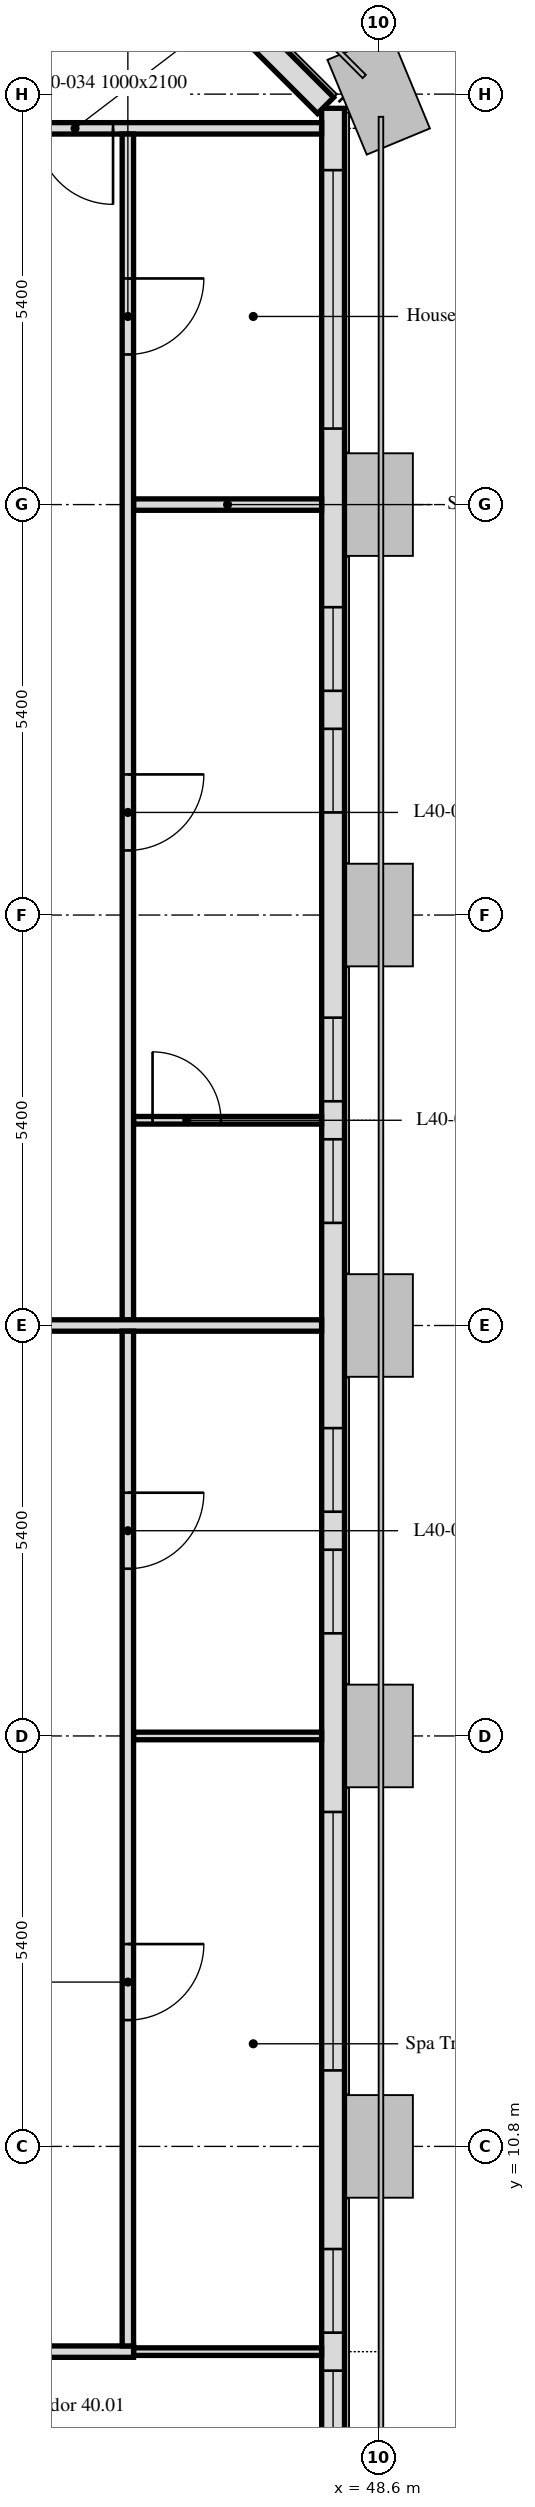
"""IFC4 building model, lengths in metres.
Left out: names, types, materials, properties, quantities, classifications, styles, units other than length and angle.
Written with IfcOpenShell. Run it as: python <this file> out.ifc"""

import sys

from ifc_helpers import new_model, si_unit, direction, frame, frame_2d, origin, place, context, subcontext, project, spatial, rectangle, extrude, element, fill, save


model = new_model("IFC4")
c1 = context("Model", 3, precision=1e-05, world=origin(), true_north=direction((0.0, 1.0)))
c2 = subcontext(c1, "Body", "Model", "MODEL_VIEW")
j1 = project(units=[si_unit("LENGTHUNIT", "METRE"), si_unit("PLANEANGLEUNIT", "RADIAN")], contexts=[c1])
p1 = place(None, origin())
s1 = spatial("IfcSite", under=j1, at=p1, CompositionType="ELEMENT")
p2 = place(p1, origin())
s2 = spatial("IfcBuilding", under=s1, at=p2, CompositionType="ELEMENT")
p3 = place(p2, frame((0.0, 0.0, 169.3)))
s3 = spatial("IfcBuildingStorey", under=s2, at=p3, CompositionType="ELEMENT", Elevation=169.3)
p4 = place(p3, frame((48.0, 5.586, 0.0), z_axis=(0.0, 0.0, 1.0), x_axis=(0.0, 1.0, 0.0)))
e1 = element("IfcWall", 1, at=p4, inside=s3, PredefinedType="SOLIDWALL", context=c2, shape_type="SweptSolid", body=[
    extrude(rectangle(XDim=32.027, YDim=0.3, at=frame_2d((16.014, 0.0))), origin(), (0.0, 0.0, 1.0), 3.0),
])
p5 = place(p4, frame((1.164, 0.0, 0.9)))
e2 = element("IfcOpeningElement", 2, at=p5, cuts=e1, PredefinedType="OPENING", context=c2, shape_type="SweptSolid", body=[
    extrude(rectangle(XDim=1.1, YDim=1.7, at=frame_2d((0.55, 0.85))), frame((0.0, 0.16, 0.0), z_axis=(0.0, -1.0, 0.0), x_axis=(1.0, 0.0, 0.0)), (0.0, 0.0, 1.0), 0.32),
])
p6 = place(p4, frame((2.764, 0.0, 0.9)))
e3 = element("IfcOpeningElement", 3, at=p6, cuts=e1, PredefinedType="OPENING", context=c2, shape_type="SweptSolid", body=[
    extrude(rectangle(XDim=1.1, YDim=1.7, at=frame_2d((0.55, 0.85))), frame((0.0, 0.16, 0.0), z_axis=(0.0, -1.0, 0.0), x_axis=(1.0, 0.0, 0.0)), (0.0, 0.0, 1.0), 0.32),
])
p7 = place(p4, frame((6.214, 0.0, 0.9)))
e4 = element("IfcOpeningElement", 4, at=p7, cuts=e1, PredefinedType="OPENING", context=c2, shape_type="SweptSolid", body=[
    extrude(rectangle(XDim=3.4, YDim=1.7, at=frame_2d((1.7, 0.85))), frame((0.0, 0.16, 0.0), z_axis=(0.0, -1.0, 0.0), x_axis=(1.0, 0.0, 0.0)), (0.0, 0.0, 1.0), 0.32),
])
p8 = place(p4, frame((11.964, 0.0, 0.9)))
e5 = element("IfcOpeningElement", 5, at=p8, cuts=e1, PredefinedType="OPENING", context=c2, shape_type="SweptSolid", body=[
    extrude(rectangle(XDim=1.1, YDim=1.7, at=frame_2d((0.55, 0.85))), frame((0.0, 0.16, 0.0), z_axis=(0.0, -1.0, 0.0), x_axis=(1.0, 0.0, 0.0)), (0.0, 0.0, 1.0), 0.32),
])
p9 = place(p4, frame((13.564, 0.0, 0.9)))
e6 = element("IfcOpeningElement", 6, at=p9, cuts=e1, PredefinedType="OPENING", context=c2, shape_type="SweptSolid", body=[
    extrude(rectangle(XDim=1.1, YDim=1.7, at=frame_2d((0.55, 0.85))), frame((0.0, 0.16, 0.0), z_axis=(0.0, -1.0, 0.0), x_axis=(1.0, 0.0, 0.0)), (0.0, 0.0, 1.0), 0.32),
])
p10 = place(p4, frame((17.364, 0.0, 0.9)))
e7 = element("IfcOpeningElement", 7, at=p10, cuts=e1, PredefinedType="OPENING", context=c2, shape_type="SweptSolid", body=[
    extrude(rectangle(XDim=1.1, YDim=1.7, at=frame_2d((0.55, 0.85))), frame((0.0, 0.16, 0.0), z_axis=(0.0, -1.0, 0.0), x_axis=(1.0, 0.0, 0.0)), (0.0, 0.0, 1.0), 0.32),
])
p11 = place(p4, frame((18.964, 0.0, 0.9)))
e8 = element("IfcOpeningElement", 8, at=p11, cuts=e1, PredefinedType="OPENING", context=c2, shape_type="SweptSolid", body=[
    extrude(rectangle(XDim=1.1, YDim=1.7, at=frame_2d((0.55, 0.85))), frame((0.0, 0.16, 0.0), z_axis=(0.0, -1.0, 0.0), x_axis=(1.0, 0.0, 0.0)), (0.0, 0.0, 1.0), 0.32),
])
p12 = place(p4, frame((22.764, 0.0, 0.9)))
e9 = element("IfcOpeningElement", 9, at=p12, cuts=e1, PredefinedType="OPENING", context=c2, shape_type="SweptSolid", body=[
    extrude(rectangle(XDim=1.1, YDim=1.7, at=frame_2d((0.55, 0.85))), frame((0.0, 0.16, 0.0), z_axis=(0.0, -1.0, 0.0), x_axis=(1.0, 0.0, 0.0)), (0.0, 0.0, 1.0), 0.32),
])
p13 = place(p4, frame((24.364, 0.0, 0.9)))
e10 = element("IfcOpeningElement", 10, at=p13, cuts=e1, PredefinedType="OPENING", context=c2, shape_type="SweptSolid", body=[
    extrude(rectangle(XDim=1.1, YDim=1.7, at=frame_2d((0.55, 0.85))), frame((0.0, 0.16, 0.0), z_axis=(0.0, -1.0, 0.0), x_axis=(1.0, 0.0, 0.0)), (0.0, 0.0, 1.0), 0.32),
])
p14 = place(p4, frame((27.814, 0.0, 0.9)))
e11 = element("IfcOpeningElement", 11, at=p14, cuts=e1, PredefinedType="OPENING", context=c2, shape_type="SweptSolid", body=[
    extrude(rectangle(XDim=3.4, YDim=1.7, at=frame_2d((1.7, 0.85))), frame((0.0, 0.16, 0.0), z_axis=(0.0, -1.0, 0.0), x_axis=(1.0, 0.0, 0.0)), (0.0, 0.0, 1.0), 0.32),
])
p15 = place(p3, frame((47.901, 37.65, 0.0), z_axis=(0.0, 0.0, 1.0), x_axis=(-0.707106781187, 0.707106781187, 0.0)))
e12 = element("IfcWall", 12, at=p15, inside=s3, PredefinedType="SOLIDWALL", context=c2, shape_type="SweptSolid", body=[
    extrude(rectangle(XDim=6.86, YDim=0.3, at=frame_2d((3.43, 0.0))), origin(), (0.0, 0.0, 1.0), 3.0),
])
p16 = place(p15, frame((1.28, 0.0, 0.9)))
e13 = element("IfcOpeningElement", 13, at=p16, cuts=e12, PredefinedType="OPENING", context=c2, shape_type="SweptSolid", body=[
    extrude(rectangle(XDim=1.1, YDim=1.7, at=frame_2d((0.55, 0.85))), frame((0.0, 0.16, 0.0), z_axis=(0.0, -1.0, 0.0), x_axis=(1.0, 0.0, 0.0)), (0.0, 0.0, 1.0), 0.32),
])
p17 = place(p15, frame((4.48, 0.0, 0.9)))
e14 = element("IfcOpeningElement", 14, at=p17, cuts=e12, PredefinedType="OPENING", context=c2, shape_type="SweptSolid", body=[
    extrude(rectangle(XDim=1.1, YDim=1.7, at=frame_2d((0.55, 0.85))), frame((0.0, 0.16, 0.0), z_axis=(0.0, -1.0, 0.0), x_axis=(1.0, 0.0, 0.0)), (0.0, 0.0, 1.0), 0.32),
])
p18 = place(p3, frame((45.375, 32.4, 0.0), z_axis=(0.0, 0.0, 1.0), x_axis=(1.0, 0.0, 0.0)))
e15 = element("IfcWall", 15, at=p18, inside=s3, PredefinedType="PARTITIONING", context=c2, shape_type="SweptSolid", body=[
    extrude(rectangle(XDim=2.474, YDim=0.15, at=frame_2d((1.237, 0.0))), origin(), (0.0, 0.0, 1.0), 2.4),
])
p19 = place(p3, frame((47.849, 37.35, 0.0), z_axis=(0.0, 0.0, 1.0), x_axis=(-1.0, 0.0, 0.0)))
e16 = element("IfcWall", 16, at=p19, inside=s3, PredefinedType="PARTITIONING", context=c2, shape_type="SweptSolid", body=[
    extrude(rectangle(XDim=41.698, YDim=0.15, at=frame_2d((20.849, 0.0))), origin(), (0.0, 0.0, 1.0), 3.0),
])
p20 = place(p19, frame((39.249, 0.0, 0.0)))
e17 = element("IfcOpeningElement", 17, at=p20, cuts=e16, PredefinedType="OPENING", context=c2, shape_type="SweptSolid", body=[
    extrude(rectangle(XDim=1.0, YDim=2.1, at=frame_2d((0.5, 1.05))), frame((0.0, 0.075, 0.0), z_axis=(0.0, -1.0, 0.0), x_axis=(1.0, 0.0, 0.0)), (0.0, 0.0, 1.0), 0.15),
])
p21 = place(p19, frame((27.649, 0.0, 0.0)))
e18 = element("IfcOpeningElement", 18, at=p21, cuts=e16, PredefinedType="OPENING", context=c2, shape_type="SweptSolid", body=[
    extrude(rectangle(XDim=1.0, YDim=2.1, at=frame_2d((0.5, 1.05))), frame((0.0, 0.075, 0.0), z_axis=(0.0, -1.0, 0.0), x_axis=(1.0, 0.0, 0.0)), (0.0, 0.0, 1.0), 0.15),
])
p22 = place(p19, frame((22.249, 0.0, 0.0)))
e19 = element("IfcOpeningElement", 19, at=p22, cuts=e16, PredefinedType="OPENING", context=c2, shape_type="SweptSolid", body=[
    extrude(rectangle(XDim=1.0, YDim=2.1, at=frame_2d((0.5, 1.05))), frame((0.0, 0.075, 0.0), z_axis=(0.0, -1.0, 0.0), x_axis=(1.0, 0.0, 0.0)), (0.0, 0.0, 1.0), 0.15),
])
p23 = place(p19, frame((17.649, 0.0, 0.0)))
e20 = element("IfcOpeningElement", 20, at=p23, cuts=e16, PredefinedType="OPENING", context=c2, shape_type="SweptSolid", body=[
    extrude(rectangle(XDim=1.0, YDim=2.1, at=frame_2d((0.5, 1.05))), frame((0.0, 0.075, 0.0), z_axis=(0.0, -1.0, 0.0), x_axis=(1.0, 0.0, 0.0)), (0.0, 0.0, 1.0), 0.15),
])
p24 = place(p19, frame((2.744, 0.0, 0.0)))
e21 = element("IfcOpeningElement", 21, at=p24, cuts=e16, PredefinedType="OPENING", context=c2, shape_type="SweptSolid", body=[
    extrude(rectangle(XDim=1.0, YDim=2.1, at=frame_2d((0.5, 1.05))), frame((0.0, 0.075, 0.0), z_axis=(0.0, -1.0, 0.0), x_axis=(1.0, 0.0, 0.0)), (0.0, 0.0, 1.0), 0.15),
])
p25 = place(p3, frame((45.375, 24.3, 0.0), z_axis=(0.0, 0.0, 1.0), x_axis=(1.0, 0.0, 0.0)))
e22 = element("IfcWall", 22, at=p25, inside=s3, PredefinedType="PARTITIONING", context=c2, shape_type="SweptSolid", body=[
    extrude(rectangle(XDim=2.474, YDim=0.1, at=frame_2d((1.237, 0.0))), origin(), (0.0, 0.0, 1.0), 3.0),
])
p26 = place(p25, frame((0.25, 0.0, 0.0)))
e23 = element("IfcOpeningElement", 23, at=p26, cuts=e22, PredefinedType="OPENING", context=c2, shape_type="SweptSolid", body=[
    extrude(rectangle(XDim=0.9, YDim=2.1, at=frame_2d((0.45, 1.05))), frame((0.0, 0.05, 0.0), z_axis=(0.0, -1.0, 0.0), x_axis=(1.0, 0.0, 0.0)), (0.0, 0.0, 1.0), 0.1),
])
p27 = place(p3, frame((45.3, 37.275, 0.0), z_axis=(0.0, 0.0, 1.0), x_axis=(0.0, -1.0, 0.0)))
e24 = element("IfcWall", 24, at=p27, inside=s3, PredefinedType="PARTITIONING", context=c2, shape_type="SweptSolid", body=[
    extrude(rectangle(XDim=15.6, YDim=0.15, at=frame_2d((7.8, 0.0))), origin(), (0.0, 0.0, 1.0), 2.4),
])
p28 = place(p27, frame((1.9, 0.0, 0.0)))
e25 = element("IfcOpeningElement", 25, at=p28, cuts=e24, PredefinedType="OPENING", context=c2, shape_type="SweptSolid", body=[
    extrude(rectangle(XDim=1.0, YDim=2.1, at=frame_2d((0.5, 1.05))), frame((0.0, 0.075, 0.0), z_axis=(0.0, -1.0, 0.0), x_axis=(1.0, 0.0, 0.0)), (0.0, 0.0, 1.0), 0.15),
])
p29 = place(p27, frame((8.425, 0.0, 0.0)))
e26 = element("IfcOpeningElement", 26, at=p29, cuts=e24, PredefinedType="OPENING", context=c2, shape_type="SweptSolid", body=[
    extrude(rectangle(XDim=1.0, YDim=2.1, at=frame_2d((0.5, 1.05))), frame((0.0, 0.075, 0.0), z_axis=(0.0, -1.0, 0.0), x_axis=(1.0, 0.0, 0.0)), (0.0, 0.0, 1.0), 0.15),
])
p30 = place(p3, frame((43.2, 21.6, 0.0), z_axis=(0.0, 0.0, 1.0), x_axis=(1.0, 0.0, 0.0)))
e27 = element("IfcWall", 27, at=p30, inside=s3, PredefinedType="PARTITIONING", context=c2, shape_type="SweptSolid", body=[
    extrude(rectangle(XDim=4.649, YDim=0.15, at=frame_2d((2.325, 0.0))), origin(), (0.0, 0.0, 1.0), 2.4),
])
p31 = place(p3, frame((45.375, 8.1, 0.0), z_axis=(0.0, 0.0, 1.0), x_axis=(1.0, 0.0, 0.0)))
e28 = element("IfcWall", 28, at=p31, inside=s3, PredefinedType="PARTITIONING", context=c2, shape_type="SweptSolid", body=[
    extrude(rectangle(XDim=2.474, YDim=0.1, at=frame_2d((1.237, 0.0))), origin(), (0.0, 0.0, 1.0), 3.0),
])
p32 = place(p3, frame((47.849, 16.2, 0.0), z_axis=(0.0, 0.0, 1.0), x_axis=(-1.0, 0.0, 0.0)))
e29 = element("IfcWall", 29, at=p32, inside=s3, PredefinedType="PARTITIONING", context=c2, shape_type="SweptSolid", body=[
    extrude(rectangle(XDim=2.474, YDim=0.1, at=frame_2d((1.237, 0.0))), origin(), (0.0, 0.0, 1.0), 2.4),
])
p33 = place(p3, frame((45.375, 8.1, 0.0), z_axis=(0.0, 0.0, 1.0), x_axis=(-1.0, 0.0, 0.0)))
e30 = element("IfcWall", 30, at=p33, inside=s3, PredefinedType="PARTITIONING", context=c2, shape_type="SweptSolid", body=[
    extrude(rectangle(XDim=39.224, YDim=0.15, at=frame_2d((19.612, 0.0))), origin(), (0.0, 0.0, 1.0), 2.4),
])
p34 = place(p33, frame((36.775, 0.0, 0.0)))
e31 = element("IfcOpeningElement", 31, at=p34, cuts=e30, PredefinedType="OPENING", context=c2, shape_type="SweptSolid", body=[
    extrude(rectangle(XDim=1.0, YDim=2.1, at=frame_2d((0.5, 1.05))), frame((0.0, 0.075, 0.0), z_axis=(0.0, -1.0, 0.0), x_axis=(1.0, 0.0, 0.0)), (0.0, 0.0, 1.0), 0.15),
])
p35 = place(p33, frame((31.375, 0.0, 0.0)))
e32 = element("IfcOpeningElement", 32, at=p35, cuts=e30, PredefinedType="OPENING", context=c2, shape_type="SweptSolid", body=[
    extrude(rectangle(XDim=1.0, YDim=2.1, at=frame_2d((0.5, 1.05))), frame((0.0, 0.075, 0.0), z_axis=(0.0, -1.0, 0.0), x_axis=(1.0, 0.0, 0.0)), (0.0, 0.0, 1.0), 0.15),
])
p36 = place(p33, frame((25.975, 0.0, 0.0)))
e33 = element("IfcOpeningElement", 33, at=p36, cuts=e30, PredefinedType="OPENING", context=c2, shape_type="SweptSolid", body=[
    extrude(rectangle(XDim=1.0, YDim=2.1, at=frame_2d((0.5, 1.05))), frame((0.0, 0.075, 0.0), z_axis=(0.0, -1.0, 0.0), x_axis=(1.0, 0.0, 0.0)), (0.0, 0.0, 1.0), 0.15),
])
p37 = place(p33, frame((20.575, 0.0, 0.0)))
e34 = element("IfcOpeningElement", 34, at=p37, cuts=e30, PredefinedType="OPENING", context=c2, shape_type="SweptSolid", body=[
    extrude(rectangle(XDim=1.0, YDim=2.1, at=frame_2d((0.5, 1.05))), frame((0.0, 0.075, 0.0), z_axis=(0.0, -1.0, 0.0), x_axis=(1.0, 0.0, 0.0)), (0.0, 0.0, 1.0), 0.15),
])
p38 = place(p33, frame((15.175, 0.0, 0.0)))
e35 = element("IfcOpeningElement", 35, at=p38, cuts=e30, PredefinedType="OPENING", context=c2, shape_type="SweptSolid", body=[
    extrude(rectangle(XDim=1.0, YDim=2.1, at=frame_2d((0.5, 1.05))), frame((0.0, 0.075, 0.0), z_axis=(0.0, -1.0, 0.0), x_axis=(1.0, 0.0, 0.0)), (0.0, 0.0, 1.0), 0.15),
])
p39 = place(p33, frame((9.775, 0.0, 0.0)))
e36 = element("IfcOpeningElement", 36, at=p39, cuts=e30, PredefinedType="OPENING", context=c2, shape_type="SweptSolid", body=[
    extrude(rectangle(XDim=1.0, YDim=2.1, at=frame_2d((0.5, 1.05))), frame((0.0, 0.075, 0.0), z_axis=(0.0, -1.0, 0.0), x_axis=(1.0, 0.0, 0.0)), (0.0, 0.0, 1.0), 0.15),
])
p40 = place(p33, frame((3.325, 0.0, 0.0)))
e37 = element("IfcOpeningElement", 37, at=p40, cuts=e30, PredefinedType="OPENING", context=c2, shape_type="SweptSolid", body=[
    extrude(rectangle(XDim=1.0, YDim=2.1, at=frame_2d((0.5, 1.05))), frame((0.0, 0.075, 0.0), z_axis=(0.0, -1.0, 0.0), x_axis=(1.0, 0.0, 0.0)), (0.0, 0.0, 1.0), 0.15),
])
p41 = place(p3, frame((45.3, 21.525, 0.0), z_axis=(0.0, 0.0, 1.0), x_axis=(0.0, -1.0, 0.0)))
e38 = element("IfcWall", 38, at=p41, inside=s3, PredefinedType="PARTITIONING", context=c2, shape_type="SweptSolid", body=[
    extrude(rectangle(XDim=13.35, YDim=0.15, at=frame_2d((6.675, 0.0))), origin(), (0.0, 0.0, 1.0), 2.4),
])
p42 = place(p41, frame((8.063, 0.0, 0.0)))
e39 = element("IfcOpeningElement", 39, at=p42, cuts=e38, PredefinedType="OPENING", context=c2, shape_type="SweptSolid", body=[
    extrude(rectangle(XDim=1.0, YDim=2.1, at=frame_2d((0.5, 1.05))), frame((0.0, 0.075, 0.0), z_axis=(0.0, -1.0, 0.0), x_axis=(1.0, 0.0, 0.0)), (0.0, 0.0, 1.0), 0.15),
])
p43 = place(p41, frame((2.125, 0.0, 0.0)))
e40 = element("IfcOpeningElement", 40, at=p43, cuts=e38, PredefinedType="OPENING", context=c2, shape_type="SweptSolid", body=[
    extrude(rectangle(XDim=1.0, YDim=2.1, at=frame_2d((0.5, 1.05))), frame((0.0, 0.075, 0.0), z_axis=(0.0, -1.0, 0.0), x_axis=(1.0, 0.0, 0.0)), (0.0, 0.0, 1.0), 0.15),
])
p44 = place(p5, origin())
e41 = element("IfcWindow", 41, at=p44, inside=s3, PartitioningType="SINGLE_PANEL", PredefinedType="WINDOW", context=c2, shape_type="SweptSolid", body=[
    extrude(rectangle(XDim=1.1, YDim=1.7, at=frame_2d((0.55, 0.85))), frame((0.0, 0.03, 0.0), z_axis=(0.0, -1.0, 0.0), x_axis=(1.0, 0.0, 0.0)), (0.0, 0.0, 1.0), 0.06),
])
fill(e2, e41)
p45 = place(p6, origin())
e42 = element("IfcWindow", 42, at=p45, inside=s3, PartitioningType="SINGLE_PANEL", PredefinedType="WINDOW", context=c2, shape_type="SweptSolid", body=[
    extrude(rectangle(XDim=1.1, YDim=1.7, at=frame_2d((0.55, 0.85))), frame((0.0, 0.03, 0.0), z_axis=(0.0, -1.0, 0.0), x_axis=(1.0, 0.0, 0.0)), (0.0, 0.0, 1.0), 0.06),
])
fill(e3, e42)
p46 = place(p7, origin())
e43 = element("IfcWindow", 43, at=p46, inside=s3, PartitioningType="SINGLE_PANEL", PredefinedType="WINDOW", context=c2, shape_type="SweptSolid", body=[
    extrude(rectangle(XDim=3.4, YDim=1.7, at=frame_2d((1.7, 0.85))), frame((0.0, 0.03, 0.0), z_axis=(0.0, -1.0, 0.0), x_axis=(1.0, 0.0, 0.0)), (0.0, 0.0, 1.0), 0.06),
])
fill(e4, e43)
p47 = place(p8, origin())
e44 = element("IfcWindow", 44, at=p47, inside=s3, PartitioningType="SINGLE_PANEL", PredefinedType="WINDOW", context=c2, shape_type="SweptSolid", body=[
    extrude(rectangle(XDim=1.1, YDim=1.7, at=frame_2d((0.55, 0.85))), frame((0.0, 0.03, 0.0), z_axis=(0.0, -1.0, 0.0), x_axis=(1.0, 0.0, 0.0)), (0.0, 0.0, 1.0), 0.06),
])
fill(e5, e44)
p48 = place(p9, origin())
e45 = element("IfcWindow", 45, at=p48, inside=s3, PartitioningType="SINGLE_PANEL", PredefinedType="WINDOW", context=c2, shape_type="SweptSolid", body=[
    extrude(rectangle(XDim=1.1, YDim=1.7, at=frame_2d((0.55, 0.85))), frame((0.0, 0.03, 0.0), z_axis=(0.0, -1.0, 0.0), x_axis=(1.0, 0.0, 0.0)), (0.0, 0.0, 1.0), 0.06),
])
fill(e6, e45)
p49 = place(p10, origin())
e46 = element("IfcWindow", 46, at=p49, inside=s3, PartitioningType="SINGLE_PANEL", PredefinedType="WINDOW", context=c2, shape_type="SweptSolid", body=[
    extrude(rectangle(XDim=1.1, YDim=1.7, at=frame_2d((0.55, 0.85))), frame((0.0, 0.03, 0.0), z_axis=(0.0, -1.0, 0.0), x_axis=(1.0, 0.0, 0.0)), (0.0, 0.0, 1.0), 0.06),
])
fill(e7, e46)
p50 = place(p11, origin())
e47 = element("IfcWindow", 47, at=p50, inside=s3, PartitioningType="SINGLE_PANEL", PredefinedType="WINDOW", context=c2, shape_type="SweptSolid", body=[
    extrude(rectangle(XDim=1.1, YDim=1.7, at=frame_2d((0.55, 0.85))), frame((0.0, 0.03, 0.0), z_axis=(0.0, -1.0, 0.0), x_axis=(1.0, 0.0, 0.0)), (0.0, 0.0, 1.0), 0.06),
])
fill(e8, e47)
p51 = place(p12, origin())
e48 = element("IfcWindow", 48, at=p51, inside=s3, PartitioningType="SINGLE_PANEL", PredefinedType="WINDOW", context=c2, shape_type="SweptSolid", body=[
    extrude(rectangle(XDim=1.1, YDim=1.7, at=frame_2d((0.55, 0.85))), frame((0.0, 0.03, 0.0), z_axis=(0.0, -1.0, 0.0), x_axis=(1.0, 0.0, 0.0)), (0.0, 0.0, 1.0), 0.06),
])
fill(e9, e48)
p52 = place(p13, origin())
e49 = element("IfcWindow", 49, at=p52, inside=s3, PartitioningType="SINGLE_PANEL", PredefinedType="WINDOW", context=c2, shape_type="SweptSolid", body=[
    extrude(rectangle(XDim=1.1, YDim=1.7, at=frame_2d((0.55, 0.85))), frame((0.0, 0.03, 0.0), z_axis=(0.0, -1.0, 0.0), x_axis=(1.0, 0.0, 0.0)), (0.0, 0.0, 1.0), 0.06),
])
fill(e10, e49)
p53 = place(p14, origin())
e50 = element("IfcWindow", 50, at=p53, inside=s3, PartitioningType="SINGLE_PANEL", PredefinedType="WINDOW", context=c2, shape_type="SweptSolid", body=[
    extrude(rectangle(XDim=3.4, YDim=1.7, at=frame_2d((1.7, 0.85))), frame((0.0, 0.03, 0.0), z_axis=(0.0, -1.0, 0.0), x_axis=(1.0, 0.0, 0.0)), (0.0, 0.0, 1.0), 0.06),
])
fill(e11, e50)
p54 = place(p28, origin())
e51 = element("IfcDoor", 51, at=p54, inside=s3, OperationType="SINGLE_SWING_LEFT", PredefinedType="DOOR", context=c2, shape_type="SweptSolid", body=[
    extrude(rectangle(XDim=1.0, YDim=2.1, at=frame_2d((0.5, 1.05))), frame((0.0, 0.025, 0.0), z_axis=(0.0, -1.0, 0.0), x_axis=(1.0, 0.0, 0.0)), (0.0, 0.0, 1.0), 0.05),
])
fill(e25, e51)
p55 = place(p26, origin())
e52 = element("IfcDoor", 52, at=p55, inside=s3, OperationType="SINGLE_SWING_LEFT", PredefinedType="DOOR", context=c2, shape_type="SweptSolid", body=[
    extrude(rectangle(XDim=0.9, YDim=2.1, at=frame_2d((0.45, 1.05))), frame((0.0, 0.025, 0.0), z_axis=(0.0, -1.0, 0.0), x_axis=(1.0, 0.0, 0.0)), (0.0, 0.0, 1.0), 0.05),
])
fill(e23, e52)
p56 = place(p42, origin())
e53 = element("IfcDoor", 53, at=p56, inside=s3, OperationType="SINGLE_SWING_LEFT", PredefinedType="DOOR", context=c2, shape_type="SweptSolid", body=[
    extrude(rectangle(XDim=1.0, YDim=2.1, at=frame_2d((0.5, 1.05))), frame((0.0, 0.025, 0.0), z_axis=(0.0, -1.0, 0.0), x_axis=(1.0, 0.0, 0.0)), (0.0, 0.0, 1.0), 0.05),
])
fill(e39, e53)
p57 = place(p43, origin())
e54 = element("IfcDoor", 54, at=p57, inside=s3, OperationType="SINGLE_SWING_RIGHT", PredefinedType="DOOR", context=c2, shape_type="SweptSolid", body=[
    extrude(rectangle(XDim=1.0, YDim=2.1, at=frame_2d((0.5, 1.05))), frame((0.0, 0.025, 0.0), z_axis=(0.0, -1.0, 0.0), x_axis=(1.0, 0.0, 0.0)), (0.0, 0.0, 1.0), 0.05),
])
fill(e40, e54)
p58 = place(p24, origin())
e55 = element("IfcDoor", 55, at=p58, inside=s3, OperationType="SINGLE_SWING_LEFT", PredefinedType="DOOR", context=c2, shape_type="SweptSolid", body=[
    extrude(rectangle(XDim=1.0, YDim=2.1, at=frame_2d((0.5, 1.05))), frame((0.0, 0.025, 0.0), z_axis=(0.0, -1.0, 0.0), x_axis=(1.0, 0.0, 0.0)), (0.0, 0.0, 1.0), 0.05),
])
fill(e21, e55)
p59 = place(p29, origin())
e56 = element("IfcDoor", 56, at=p59, inside=s3, OperationType="SINGLE_SWING_RIGHT", PredefinedType="DOOR", context=c2, shape_type="SweptSolid", body=[
    extrude(rectangle(XDim=1.0, YDim=2.1, at=frame_2d((0.5, 1.05))), frame((0.0, 0.025, 0.0), z_axis=(0.0, -1.0, 0.0), x_axis=(1.0, 0.0, 0.0)), (0.0, 0.0, 1.0), 0.05),
])
fill(e26, e56)
save(model, sys.argv[1])
